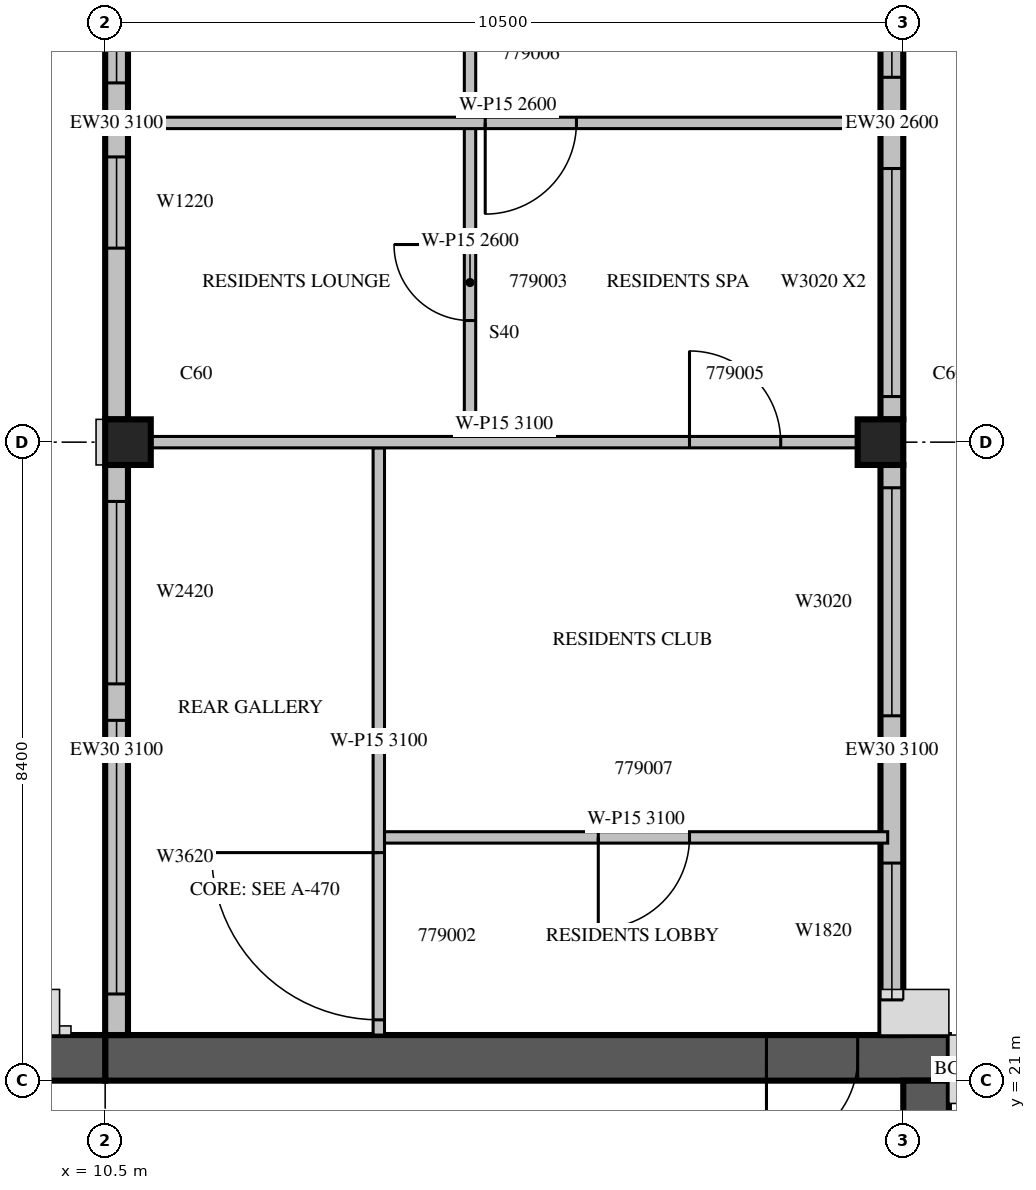
"""IFC4 building model, lengths in metres.
Left out: names, types, materials, properties, quantities, classifications, styles, units other than length and angle.
Written with IfcOpenShell. Run it as: python <this file> out.ifc"""

import sys

from ifc_helpers import new_model, si_unit, direction, frame, frame_2d, origin, origin_2d, place, context, subcontext, project, spatial, rectangle, extrude, source, transform, mapped, element, fill, save


model = new_model("IFC4")
c1 = context("Model", 3, precision=1e-05, world=origin(), true_north=direction((0.0, 1.0)))
c2 = subcontext(c1, "Body", "Model", "MODEL_VIEW")
j1 = project(units=[si_unit("LENGTHUNIT", "METRE"), si_unit("PLANEANGLEUNIT", "RADIAN")], contexts=[c1])
p1 = place(None, origin())
s1 = spatial("IfcSite", under=j1, at=p1, CompositionType="ELEMENT")
p2 = place(p1, origin())
s2 = spatial("IfcBuilding", under=s1, at=p2, CompositionType="ELEMENT")
p3 = place(p2, frame((0.0, 0.0, 337.0)))
s3 = spatial("IfcBuildingStorey", under=s2, at=p3, CompositionType="ELEMENT", Elevation=337.0)
m1 = source(origin(), c2, "Body", "SweptSolid", [
    extrude(rectangle(XDim=0.6, YDim=0.6, at=origin_2d()), origin(), (0.0, 0.0, 1.0), 3.5),
])
for number, where, z_axis, x_axis in (
    (1, (10.8, 29.4, 0.0), (0.0, 0.0, 1.0), (1.0, 0.0, 0.0)),
    (2, (20.7, 29.4, 0.0), (0.0, 0.0, 1.0), (1.0, 0.0, 0.0)),
):
    element("IfcColumn", number, at=place(p3, frame(where, z_axis=z_axis, x_axis=x_axis)), inside=s3, PredefinedType="COLUMN", context=c2, shape_type="MappedRepresentation", body=[
        mapped(m1, transform((0.0, 0.0, 0.0), scale=1.0)),
    ])
m2 = source(origin(), c2, "Body", "SweptSolid", [
    extrude(rectangle(XDim=11.1, YDim=0.6, at=frame_2d((5.55, 0.0))), origin(), (0.0, 0.0, 1.0), 3.5),
])
p4 = place(p3, frame((10.5, 21.3, 0.0), z_axis=(0.0, 0.0, 1.0), x_axis=(1.0, 0.0, 0.0)))
e3 = element("IfcWall", 3, at=p4, inside=s3, PredefinedType="SHEAR", context=c2, shape_type="MappedRepresentation", body=[
    mapped(m2, transform((0.0, 0.0, 0.0), scale=1.0)),
])
m3 = source(origin(), c2, "Body", "SweptSolid", [
    extrude(rectangle(XDim=1.2, YDim=2.1, at=frame_2d((0.6, 1.05))), frame((0.0, 0.31, 0.0), z_axis=(0.0, -1.0, 0.0), x_axis=(1.0, 0.0, 0.0)), (0.0, 0.0, 1.0), 0.62),
])
p5 = place(p4, frame((8.7, 0.0, 0.0)))
e4 = element("IfcOpeningElement", 4, at=p5, cuts=e3, PredefinedType="OPENING", context=c2, shape_type="MappedRepresentation", body=[
    mapped(m3, transform((0.0, 0.0, 0.0), scale=1.0)),
])
m4 = source(origin(), c2, "Body", "SweptSolid", [
    extrude(rectangle(XDim=16.8, YDim=0.6, at=frame_2d((8.4, 0.0))), origin(), (0.0, 0.0, 1.0), 3.5),
])
p6 = place(p3, frame((21.3, 4.2, 0.0), z_axis=(0.0, 0.0, 1.0), x_axis=(0.0, 1.0, 0.0)))
e5 = element("IfcWall", 5, at=p6, inside=s3, PredefinedType="SHEAR", context=c2, shape_type="MappedRepresentation", body=[
    mapped(m4, transform((0.0, 0.0, 0.0), scale=1.0)),
])
m5 = source(origin(), c2, "Body", "SweptSolid", [
    extrude(rectangle(XDim=1.2, YDim=2.4, at=frame_2d((0.6, 1.2))), frame((0.0, 0.31, 0.0), z_axis=(0.0, -1.0, 0.0), x_axis=(1.0, 0.0, 0.0)), (0.0, 0.0, 1.0), 0.62),
])
p7 = place(p6, frame((12.0, 0.0, 0.6)))
e6 = element("IfcOpeningElement", 6, at=p7, cuts=e5, PredefinedType="OPENING", context=c2, shape_type="MappedRepresentation", body=[
    mapped(m5, transform((0.0, 0.0, 0.0), scale=1.0)),
])
m6 = source(origin(), c2, "Body", "SweptSolid", [
    extrude(rectangle(XDim=6.6, YDim=0.6, at=frame_2d((3.3, 0.0))), origin(), (0.0, 0.0, 1.0), 3.5),
])
p8 = place(p3, frame((3.9, 21.3, 0.0), z_axis=(0.0, 0.0, 1.0), x_axis=(1.0, 0.0, 0.0)))
e7 = element("IfcWall", 7, at=p8, inside=s3, PredefinedType="SHEAR", context=c2, shape_type="MappedRepresentation", body=[
    mapped(m6, transform((0.0, 0.0, 0.0), scale=1.0)),
])
p9 = place(p8, frame((1.5, 0.0, 0.6)))
e8 = element("IfcOpeningElement", 8, at=p9, cuts=e7, PredefinedType="OPENING", context=c2, shape_type="MappedRepresentation", body=[
    mapped(m5, transform((0.0, 0.0, 0.0), scale=1.0)),
])
p10 = place(p8, frame((3.6, 0.0, 0.6)))
e9 = element("IfcOpeningElement", 9, at=p10, cuts=e7, PredefinedType="OPENING", context=c2, shape_type="MappedRepresentation", body=[
    mapped(m5, transform((0.0, 0.0, 0.0), scale=1.0)),
])
m7 = source(origin(), c2, "Body", "SweptSolid", [
    extrude(rectangle(XDim=7.5, YDim=0.3, at=frame_2d((3.75, 0.0))), origin(), (0.0, 0.0, 1.0), 3.1),
])
p11 = place(p3, frame((20.85, 21.6, 0.0), z_axis=(0.0, 0.0, 1.0), x_axis=(0.0, 1.0, 0.0)))
e10 = element("IfcWall", 10, at=p11, inside=s3, PredefinedType="STANDARD", context=c2, shape_type="MappedRepresentation", body=[
    mapped(m7, transform((0.0, 0.0, 0.0), scale=1.0)),
])
m8 = source(origin(), c2, "Body", "SweptSolid", [
    extrude(rectangle(XDim=1.8, YDim=2.0, at=frame_2d((0.9, 1.0))), frame((0.0, 0.16, 0.0), z_axis=(0.0, -1.0, 0.0), x_axis=(1.0, 0.0, 0.0)), (0.0, 0.0, 1.0), 0.32),
])
p12 = place(p11, frame((0.463, 0.0, 0.6)))
e11 = element("IfcOpeningElement", 11, at=p12, cuts=e10, PredefinedType="OPENING", context=c2, shape_type="MappedRepresentation", body=[
    mapped(m8, transform((0.0, 0.0, 0.0), scale=1.0)),
])
m9 = source(origin(), c2, "Body", "SweptSolid", [
    extrude(rectangle(XDim=3.0, YDim=2.0, at=frame_2d((1.5, 1.0))), frame((0.0, 0.16, 0.0), z_axis=(0.0, -1.0, 0.0), x_axis=(1.0, 0.0, 0.0)), (0.0, 0.0, 1.0), 0.32),
])
p13 = place(p11, frame((4.2, 0.0, 0.6)))
e12 = element("IfcOpeningElement", 12, at=p13, cuts=e10, PredefinedType="OPENING", context=c2, shape_type="MappedRepresentation", body=[
    mapped(m9, transform((0.0, 0.0, 0.0), scale=1.0)),
])
m10 = source(origin(), c2, "Body", "SweptSolid", [
    extrude(rectangle(XDim=7.8, YDim=0.3, at=frame_2d((3.9, 0.0))), origin(), (0.0, 0.0, 1.0), 2.6),
])
p14 = place(p3, frame((20.85, 29.7, 0.0), z_axis=(0.0, 0.0, 1.0), x_axis=(0.0, 1.0, 0.0)))
e13 = element("IfcWall", 13, at=p14, inside=s3, PredefinedType="STANDARD", context=c2, shape_type="MappedRepresentation", body=[
    mapped(m10, transform((0.0, 0.0, 0.0), scale=1.0)),
])
p15 = place(p14, frame((0.3, 0.0, 0.6)))
e14 = element("IfcOpeningElement", 14, at=p15, cuts=e13, PredefinedType="OPENING", context=c2, shape_type="MappedRepresentation", body=[
    mapped(m9, transform((0.0, 0.0, 0.0), scale=1.0)),
])
p16 = place(p14, frame((4.5, 0.0, 0.6)))
e15 = element("IfcOpeningElement", 15, at=p16, cuts=e13, PredefinedType="OPENING", context=c2, shape_type="MappedRepresentation", body=[
    mapped(m9, transform((0.0, 0.0, 0.0), scale=1.0)),
])
m11 = source(origin(), c2, "Body", "SweptSolid", [
    extrude(rectangle(XDim=7.8, YDim=0.3, at=frame_2d((3.9, 0.0))), origin(), (0.0, 0.0, 1.0), 3.1),
])
p17 = place(p3, frame((10.65, 37.5, 0.0), z_axis=(0.0, 0.0, 1.0), x_axis=(0.0, -1.0, 0.0)))
e16 = element("IfcWall", 16, at=p17, inside=s3, PredefinedType="STANDARD", context=c2, shape_type="MappedRepresentation", body=[
    mapped(m11, transform((0.0, 0.0, 0.0), scale=1.0)),
])
m12 = source(origin(), c2, "Body", "SweptSolid", [
    extrude(rectangle(XDim=1.2, YDim=2.0, at=frame_2d((0.6, 1.0))), frame((0.0, 0.16, 0.0), z_axis=(0.0, -1.0, 0.0), x_axis=(1.0, 0.0, 0.0)), (0.0, 0.0, 1.0), 0.32),
])
p18 = place(p17, frame((4.348, 0.0, 0.6)))
e17 = element("IfcOpeningElement", 17, at=p18, cuts=e16, PredefinedType="OPENING", context=c2, shape_type="MappedRepresentation", body=[
    mapped(m12, transform((0.0, 0.0, 0.0), scale=1.0)),
])
m13 = source(origin(), c2, "Body", "SweptSolid", [
    extrude(rectangle(XDim=2.4, YDim=2.0, at=frame_2d((1.2, 1.0))), frame((0.0, 0.16, 0.0), z_axis=(0.0, -1.0, 0.0), x_axis=(1.0, 0.0, 0.0)), (0.0, 0.0, 1.0), 0.32),
])
p19 = place(p17, frame((0.974, 0.0, 0.6)))
e18 = element("IfcOpeningElement", 18, at=p19, cuts=e16, PredefinedType="OPENING", context=c2, shape_type="MappedRepresentation", body=[
    mapped(m13, transform((0.0, 0.0, 0.0), scale=1.0)),
])
p20 = place(p3, frame((10.65, 29.1, 0.0), z_axis=(0.0, 0.0, 1.0), x_axis=(0.0, -1.0, 0.0)))
e19 = element("IfcWall", 19, at=p20, inside=s3, PredefinedType="STANDARD", context=c2, shape_type="MappedRepresentation", body=[
    mapped(m7, transform((0.0, 0.0, 0.0), scale=1.0)),
])
m14 = source(origin(), c2, "Body", "SweptSolid", [
    extrude(rectangle(XDim=3.6, YDim=2.0, at=frame_2d((1.8, 1.0))), frame((0.0, 0.16, 0.0), z_axis=(0.0, -1.0, 0.0), x_axis=(1.0, 0.0, 0.0)), (0.0, 0.0, 1.0), 0.32),
])
p21 = place(p20, frame((3.36, 0.0, 0.6)))
e20 = element("IfcOpeningElement", 20, at=p21, cuts=e19, PredefinedType="OPENING", context=c2, shape_type="MappedRepresentation", body=[
    mapped(m14, transform((0.0, 0.0, 0.0), scale=1.0)),
])
p22 = place(p20, frame((0.48, 0.0, 0.6)))
e21 = element("IfcOpeningElement", 21, at=p22, cuts=e19, PredefinedType="OPENING", context=c2, shape_type="MappedRepresentation", body=[
    mapped(m13, transform((0.0, 0.0, 0.0), scale=1.0)),
])
m15 = source(origin(), c2, "Body", "SweptSolid", [
    extrude(rectangle(XDim=7.725, YDim=0.15, at=frame_2d((3.862, 0.0))), origin(), (0.0, 0.0, 1.0), 3.1),
])
p23 = place(p3, frame((14.1, 29.325, 0.0), z_axis=(0.0, 0.0, 1.0), x_axis=(0.0, -1.0, 0.0)))
e22 = element("IfcWall", 22, at=p23, inside=s3, PredefinedType="PARTITIONING", context=c2, shape_type="MappedRepresentation", body=[
    mapped(m15, transform((0.0, 0.0, 0.0), scale=1.0)),
])
m16 = source(origin(), c2, "Body", "SweptSolid", [
    extrude(rectangle(XDim=2.2, YDim=2.1, at=frame_2d((1.1, 1.05))), frame((0.0, 0.085, 0.0), z_axis=(0.0, -1.0, 0.0), x_axis=(1.0, 0.0, 0.0)), (0.0, 0.0, 1.0), 0.17),
])
p24 = place(p23, frame((5.325, 0.0, 0.0)))
e23 = element("IfcOpeningElement", 23, at=p24, cuts=e22, PredefinedType="OPENING", context=c2, shape_type="MappedRepresentation", body=[
    mapped(m16, transform((0.0, 0.0, 0.0), scale=1.0)),
])
m17 = source(origin(), c2, "Body", "SweptSolid", [
    extrude(rectangle(XDim=6.62, YDim=0.15, at=frame_2d((3.31, 0.0))), origin(), (0.0, 0.0, 1.0), 3.1),
])
p25 = place(p3, frame((14.175, 24.2, 0.0), z_axis=(0.0, 0.0, 1.0), x_axis=(1.0, 0.0, 0.0)))
e24 = element("IfcWall", 24, at=p25, inside=s3, PredefinedType="PARTITIONING", context=c2, shape_type="MappedRepresentation", body=[
    mapped(m17, transform((0.0, 0.0, 0.0), scale=1.0)),
])
m18 = source(origin(), c2, "Body", "SweptSolid", [
    extrude(rectangle(XDim=1.2, YDim=2.1, at=frame_2d((0.6, 1.05))), frame((0.0, 0.085, 0.0), z_axis=(0.0, -1.0, 0.0), x_axis=(1.0, 0.0, 0.0)), (0.0, 0.0, 1.0), 0.17),
])
p26 = place(p25, frame((2.812, 0.0, 0.0)))
e25 = element("IfcOpeningElement", 25, at=p26, cuts=e24, PredefinedType="OPENING", context=c2, shape_type="MappedRepresentation", body=[
    mapped(m18, transform((0.0, 0.0, 0.0), scale=1.0)),
])
p27 = place(p3, frame((15.3, 33.6, 0.0), z_axis=(0.0, 0.0, 1.0), x_axis=(0.0, -1.0, 0.0)))
e26 = element("IfcWall", 26, at=p27, inside=s3, PredefinedType="PARTITIONING", context=c2, shape_type="SweptSolid", body=[
    extrude(rectangle(XDim=4.2, YDim=0.15, at=frame_2d((2.1, 0.0))), origin(), (0.0, 0.0, 1.0), 2.6),
])
m19 = source(origin(), c2, "Body", "SweptSolid", [
    extrude(rectangle(XDim=1.0, YDim=2.1, at=frame_2d((0.5, 1.05))), frame((0.0, 0.085, 0.0), z_axis=(0.0, -1.0, 0.0), x_axis=(1.0, 0.0, 0.0)), (0.0, 0.0, 1.0), 0.17),
])
p28 = place(p27, frame((1.6, 0.0, 0.0)))
e27 = element("IfcOpeningElement", 27, at=p28, cuts=e26, PredefinedType="OPENING", context=c2, shape_type="MappedRepresentation", body=[
    mapped(m19, transform((0.0, 0.0, 0.0), scale=1.0)),
])
p29 = place(p3, frame((15.3, 37.725, 0.0), z_axis=(0.0, 0.0, 1.0), x_axis=(0.0, -1.0, 0.0)))
e28 = element("IfcWall", 28, at=p29, inside=s3, PredefinedType="PARTITIONING", context=c2, shape_type="SweptSolid", body=[
    extrude(rectangle(XDim=4.105, YDim=0.15, at=frame_2d((2.053, 0.0))), origin(), (0.0, 0.0, 1.0), 2.6),
])
p30 = place(p29, frame((1.525, 0.0, 0.0)))
e29 = element("IfcOpeningElement", 29, at=p30, cuts=e28, PredefinedType="OPENING", context=c2, shape_type="MappedRepresentation", body=[
    mapped(m19, transform((0.0, 0.0, 0.0), scale=1.0)),
])
m20 = source(origin(), c2, "Body", "SweptSolid", [
    extrude(rectangle(XDim=9.302, YDim=0.15, at=frame_2d((4.651, 0.0))), origin(), (0.0, 0.0, 1.0), 3.1),
])
p31 = place(p3, frame((11.099, 29.4, 0.0), z_axis=(0.0, 0.0, 1.0), x_axis=(1.0, 0.0, 0.0)))
e30 = element("IfcWall", 30, at=p31, inside=s3, PredefinedType="PARTITIONING", context=c2, shape_type="MappedRepresentation", body=[
    mapped(m20, transform((0.0, 0.0, 0.0), scale=1.0)),
])
p32 = place(p31, frame((7.088, 0.0, 0.0)))
e31 = element("IfcOpeningElement", 31, at=p32, cuts=e30, PredefinedType="OPENING", context=c2, shape_type="MappedRepresentation", body=[
    mapped(m18, transform((0.0, 0.0, 0.0), scale=1.0)),
])
p33 = place(p3, frame((10.8, 33.6, 0.0), z_axis=(0.0, 0.0, 1.0), x_axis=(1.0, 0.0, 0.0)))
e32 = element("IfcWall", 32, at=p33, inside=s3, PredefinedType="PARTITIONING", context=c2, shape_type="SweptSolid", body=[
    extrude(rectangle(XDim=9.995, YDim=0.15, at=frame_2d((4.997, 0.0))), origin(), (0.0, 0.0, 1.0), 2.6),
])
p34 = place(p33, frame((4.7, 0.0, 0.0)))
e33 = element("IfcOpeningElement", 33, at=p34, cuts=e32, PredefinedType="OPENING", context=c2, shape_type="MappedRepresentation", body=[
    mapped(m18, transform((0.0, 0.0, 0.0), scale=1.0)),
])
m21 = source(origin(), c2, "Body", "SweptSolid", [
    extrude(rectangle(XDim=1.8, YDim=2.0, at=frame_2d((0.9, 1.0))), frame((0.0, 0.03, 0.0), z_axis=(0.0, -1.0, 0.0), x_axis=(1.0, 0.0, 0.0)), (0.0, 0.0, 1.0), 0.06),
])
p35 = place(p12, origin())
e34 = element("IfcWindow", 34, at=p35, inside=s3, PartitioningType="SINGLE_PANEL", PredefinedType="WINDOW", context=c2, shape_type="MappedRepresentation", body=[
    mapped(m21, transform((0.0, 0.0, 0.0), scale=1.0)),
])
fill(e11, e34)
m22 = source(origin(), c2, "Body", "SweptSolid", [
    extrude(rectangle(XDim=3.0, YDim=2.0, at=frame_2d((1.5, 1.0))), frame((0.0, 0.03, 0.0), z_axis=(0.0, -1.0, 0.0), x_axis=(1.0, 0.0, 0.0)), (0.0, 0.0, 1.0), 0.06),
])
p36 = place(p13, origin())
e35 = element("IfcWindow", 35, at=p36, inside=s3, PartitioningType="SINGLE_PANEL", PredefinedType="WINDOW", context=c2, shape_type="MappedRepresentation", body=[
    mapped(m22, transform((0.0, 0.0, 0.0), scale=1.0)),
])
fill(e12, e35)
p37 = place(p15, origin())
e36 = element("IfcWindow", 36, at=p37, inside=s3, PartitioningType="SINGLE_PANEL", PredefinedType="WINDOW", context=c2, shape_type="MappedRepresentation", body=[
    mapped(m22, transform((0.0, 0.0, 0.0), scale=1.0)),
])
fill(e14, e36)
p38 = place(p16, origin())
e37 = element("IfcWindow", 37, at=p38, inside=s3, PartitioningType="SINGLE_PANEL", PredefinedType="WINDOW", context=c2, shape_type="MappedRepresentation", body=[
    mapped(m22, transform((0.0, 0.0, 0.0), scale=1.0)),
])
fill(e15, e37)
m23 = source(origin(), c2, "Body", "SweptSolid", [
    extrude(rectangle(XDim=1.2, YDim=2.0, at=frame_2d((0.6, 1.0))), frame((0.0, 0.03, 0.0), z_axis=(0.0, -1.0, 0.0), x_axis=(1.0, 0.0, 0.0)), (0.0, 0.0, 1.0), 0.06),
])
p39 = place(p18, origin())
e38 = element("IfcWindow", 38, at=p39, inside=s3, PartitioningType="SINGLE_PANEL", PredefinedType="WINDOW", context=c2, shape_type="MappedRepresentation", body=[
    mapped(m23, transform((0.0, 0.0, 0.0), scale=1.0)),
])
fill(e17, e38)
m24 = source(origin(), c2, "Body", "SweptSolid", [
    extrude(rectangle(XDim=3.6, YDim=2.0, at=frame_2d((1.8, 1.0))), frame((0.0, 0.03, 0.0), z_axis=(0.0, -1.0, 0.0), x_axis=(1.0, 0.0, 0.0)), (0.0, 0.0, 1.0), 0.06),
])
p40 = place(p21, origin())
e39 = element("IfcWindow", 39, at=p40, inside=s3, PartitioningType="SINGLE_PANEL", PredefinedType="WINDOW", context=c2, shape_type="MappedRepresentation", body=[
    mapped(m24, transform((0.0, 0.0, 0.0), scale=1.0)),
])
fill(e20, e39)
m25 = source(origin(), c2, "Body", "SweptSolid", [
    extrude(rectangle(XDim=2.4, YDim=2.0, at=frame_2d((1.2, 1.0))), frame((0.0, 0.03, 0.0), z_axis=(0.0, -1.0, 0.0), x_axis=(1.0, 0.0, 0.0)), (0.0, 0.0, 1.0), 0.06),
])
p41 = place(p19, origin())
e40 = element("IfcWindow", 40, at=p41, inside=s3, PartitioningType="SINGLE_PANEL", PredefinedType="WINDOW", context=c2, shape_type="MappedRepresentation", body=[
    mapped(m25, transform((0.0, 0.0, 0.0), scale=1.0)),
])
fill(e18, e40)
p42 = place(p22, origin())
e41 = element("IfcWindow", 41, at=p42, inside=s3, PartitioningType="SINGLE_PANEL", PredefinedType="WINDOW", context=c2, shape_type="MappedRepresentation", body=[
    mapped(m25, transform((0.0, 0.0, 0.0), scale=1.0)),
])
fill(e21, e41)
m26 = source(origin(), c2, "Body", "SweptSolid", [
    extrude(rectangle(XDim=1.2, YDim=2.1, at=frame_2d((0.6, 1.05))), frame((0.0, 0.025, 0.0), z_axis=(0.0, -1.0, 0.0), x_axis=(1.0, 0.0, 0.0)), (0.0, 0.0, 1.0), 0.05),
])
p43 = place(p5, origin())
e42 = element("IfcDoor", 42, at=p43, inside=s3, OperationType="SINGLE_SWING_RIGHT", PredefinedType="DOOR", context=c2, shape_type="MappedRepresentation", body=[
    mapped(m26, transform((0.0, 0.0, 0.0), scale=1.0)),
])
fill(e4, e42)
m27 = source(origin(), c2, "Body", "SweptSolid", [
    extrude(rectangle(XDim=2.2, YDim=2.1, at=frame_2d((1.1, 1.05))), frame((0.0, 0.025, 0.0), z_axis=(0.0, -1.0, 0.0), x_axis=(1.0, 0.0, 0.0)), (0.0, 0.0, 1.0), 0.05),
])
p44 = place(p24, origin())
e43 = element("IfcDoor", 43, at=p44, inside=s3, OperationType="DOUBLE_DOOR_SINGLE_SWING", PredefinedType="DOOR", context=c2, shape_type="MappedRepresentation", body=[
    mapped(m27, transform((0.0, 0.0, 0.0), scale=1.0)),
])
fill(e23, e43)
m28 = source(origin(), c2, "Body", "SweptSolid", [
    extrude(rectangle(XDim=1.0, YDim=2.1, at=frame_2d((0.5, 1.05))), frame((0.0, 0.025, 0.0), z_axis=(0.0, -1.0, 0.0), x_axis=(1.0, 0.0, 0.0)), (0.0, 0.0, 1.0), 0.05),
])
p45 = place(p28, origin())
e44 = element("IfcDoor", 44, at=p45, inside=s3, OperationType="SINGLE_SWING_RIGHT", PredefinedType="DOOR", context=c2, shape_type="MappedRepresentation", body=[
    mapped(m28, transform((0.0, 0.0, 0.0), scale=1.0)),
])
fill(e27, e44)
p46 = place(p32, origin())
e45 = element("IfcDoor", 45, at=p46, inside=s3, OperationType="SINGLE_SWING_LEFT", PredefinedType="DOOR", context=c2, shape_type="MappedRepresentation", body=[
    mapped(m26, transform((0.0, 0.0, 0.0), scale=1.0)),
])
fill(e31, e45)
p47 = place(p34, origin())
e46 = element("IfcDoor", 46, at=p47, inside=s3, OperationType="SINGLE_SWING_RIGHT", PredefinedType="DOOR", context=c2, shape_type="MappedRepresentation", body=[
    mapped(m26, transform((0.0, 0.0, 0.0), scale=1.0)),
])
fill(e33, e46)
p48 = place(p26, origin())
e47 = element("IfcDoor", 47, at=p48, inside=s3, OperationType="SINGLE_SWING_RIGHT", PredefinedType="DOOR", context=c2, shape_type="MappedRepresentation", body=[
    mapped(m26, transform((0.0, 0.0, 0.0), scale=1.0)),
])
fill(e25, e47)
save(model, sys.argv[1])
